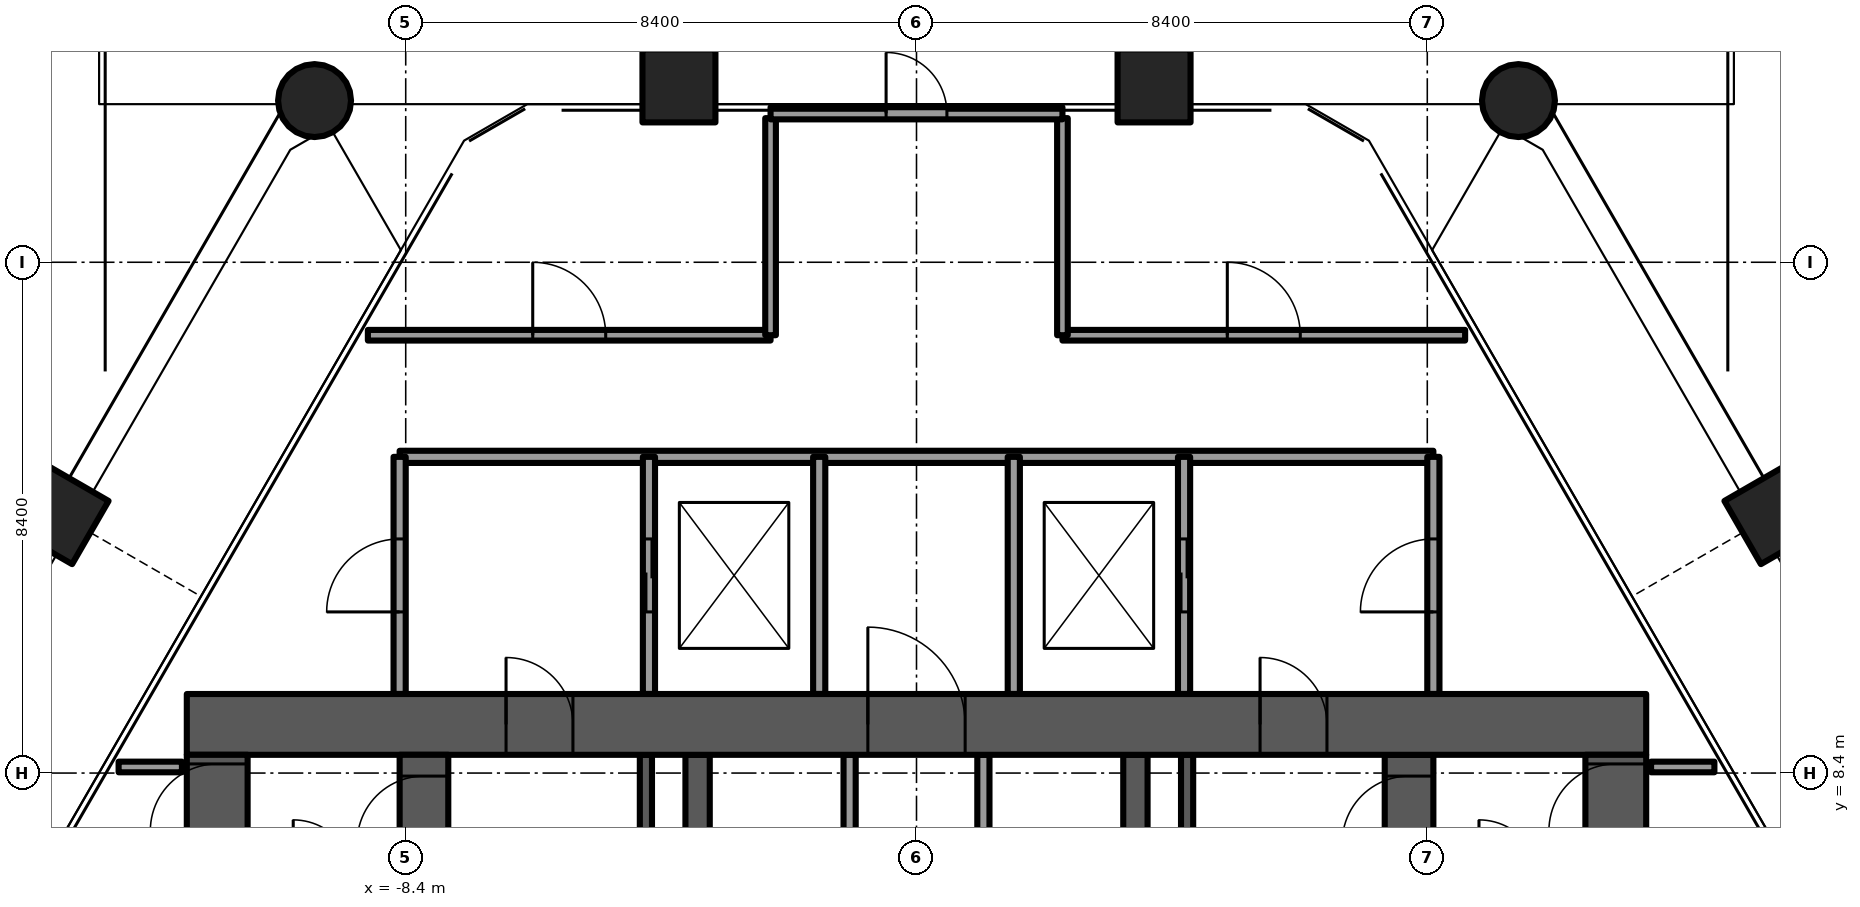
"""IFC4 building model, lengths in metres.
Left out: names, types, materials, properties, quantities, classifications, styles, units other than length and angle.
Written with IfcOpenShell. Run it as: python <this file> out.ifc"""

import sys

from ifc_helpers import new_model, si_unit, direction, frame, frame_2d, origin, origin_2d, place, context, subcontext, project, spatial, rectangle, circle, extrude, element, fill, save


model = new_model("IFC4")
c1 = context("Model", 3, precision=1e-05, world=origin(), true_north=direction((0.0, 1.0)))
c2 = subcontext(c1, "Body", "Model", "MODEL_VIEW")
j1 = project(units=[si_unit("LENGTHUNIT", "METRE"), si_unit("PLANEANGLEUNIT", "RADIAN")], contexts=[c1])
p1 = place(None, origin())
s1 = spatial("IfcSite", under=j1, at=p1, CompositionType="ELEMENT")
p2 = place(p1, origin())
s2 = spatial("IfcBuilding", under=s1, at=p2, CompositionType="ELEMENT")
p3 = place(p2, frame((0.0, 0.0, 146.0)))
s3 = spatial("IfcBuildingStorey", under=s2, at=p3, CompositionType="ELEMENT", Elevation=146.0)
for number, where, z_axis, x_axis in (
    (1, (-9.899, 19.459, -1.2), (0.0, 0.0, 1.0), (1.0, 0.0, 0.0)),
    (2, (9.899, 19.459, -1.2), (0.0, 0.0, 1.0), (1.0, 0.0, 0.0)),
):
    element("IfcColumn", number, at=place(p3, frame(where, z_axis=z_axis, x_axis=x_axis)), inside=s3, PredefinedType="COLUMN", context=c2, shape_type="SweptSolid", body=[
        extrude(circle(Radius=0.6, at=origin_2d()), origin(), (0.0, 0.0, 1.0), 5.0),
    ])
for number, where, z_axis, x_axis in (
    (3, (3.907, 19.7, -1.2), (0.0, 0.0, 1.0), (1.0, 0.0, 0.0)),
    (4, (-3.907, 19.7, -1.2), (0.0, 0.0, 1.0), (1.0, 0.0, 0.0)),
    (5, (-14.106, 12.655, -1.2), (0.0, 0.0, 1.0), (0.5, 0.866, 0.0)),
    (6, (14.106, 12.655, -1.2), (0.0, 0.0, 1.0), (0.5, -0.866, 0.0)),
):
    element("IfcColumn", number, at=place(p3, frame(where, z_axis=z_axis, x_axis=x_axis)), inside=s3, PredefinedType="COLUMN", context=c2, shape_type="SweptSolid", body=[
        extrude(rectangle(XDim=1.2, YDim=1.2, at=origin_2d()), origin(), (0.0, 0.0, 1.0), 5.0),
    ])
p4 = place(p3, frame((-12.0, 9.2, -0.3), z_axis=(0.0, 0.0, 1.0), x_axis=(1.0, 0.0, 0.0)))
e7 = element("IfcWall", 7, at=p4, inside=s3, PredefinedType="SHEAR", context=c2, shape_type="SweptSolid", body=[
    extrude(rectangle(XDim=24.0, YDim=1.0, at=frame_2d((12.0, 0.0))), origin(), (0.0, 0.0, 1.0), 5.0),
])
p5 = place(p4, frame((11.2, 0.0, 0.0)))
e8 = element("IfcOpeningElement", 8, at=p5, cuts=e7, PredefinedType="OPENING", context=c2, shape_type="SweptSolid", body=[
    extrude(rectangle(XDim=1.6, YDim=2.1, at=frame_2d((0.8, 1.05))), frame((0.0, 0.5, 0.0), z_axis=(0.0, -1.0, 0.0), x_axis=(1.0, 0.0, 0.0)), (0.0, 0.0, 1.0), 1.0),
])
p6 = place(p4, frame((5.25, 0.0, 0.0)))
e9 = element("IfcOpeningElement", 9, at=p6, cuts=e7, PredefinedType="OPENING", context=c2, shape_type="SweptSolid", body=[
    extrude(rectangle(XDim=1.1, YDim=2.1, at=frame_2d((0.55, 1.05))), frame((0.0, 0.5, 0.0), z_axis=(0.0, -1.0, 0.0), x_axis=(1.0, 0.0, 0.0)), (0.0, 0.0, 1.0), 1.0),
])
p7 = place(p4, frame((17.65, 0.0, 0.0)))
e10 = element("IfcOpeningElement", 10, at=p7, cuts=e7, PredefinedType="OPENING", context=c2, shape_type="SweptSolid", body=[
    extrude(rectangle(XDim=1.1, YDim=2.1, at=frame_2d((0.55, 1.05))), frame((0.0, 0.5, 0.0), z_axis=(0.0, -1.0, 0.0), x_axis=(1.0, 0.0, 0.0)), (0.0, 0.0, 1.0), 1.0),
])
p8 = place(p3, frame((-8.1, -0.7, -0.3), z_axis=(0.0, 0.0, 1.0), x_axis=(0.0, 1.0, 0.0)))
e11 = element("IfcWall", 11, at=p8, inside=s3, PredefinedType="SHEAR", context=c2, shape_type="SweptSolid", body=[
    extrude(rectangle(XDim=9.4, YDim=0.8, at=frame_2d((4.7, 0.0))), origin(), (0.0, 0.0, 1.0), 5.0),
])
p9 = place(p8, frame((7.95, 0.0, 0.0)))
e12 = element("IfcOpeningElement", 12, at=p9, cuts=e11, PredefinedType="OPENING", context=c2, shape_type="SweptSolid", body=[
    extrude(rectangle(XDim=1.1, YDim=2.1, at=frame_2d((0.55, 1.05))), frame((0.0, 0.4, 0.0), z_axis=(0.0, -1.0, 0.0), x_axis=(1.0, 0.0, 0.0)), (0.0, 0.0, 1.0), 0.8),
])
p10 = place(p3, frame((8.1, -0.7, -0.3), z_axis=(0.0, 0.0, 1.0), x_axis=(0.0, 1.0, 0.0)))
e13 = element("IfcWall", 13, at=p10, inside=s3, PredefinedType="SHEAR", context=c2, shape_type="SweptSolid", body=[
    extrude(rectangle(XDim=9.4, YDim=0.8, at=frame_2d((4.7, 0.0))), origin(), (0.0, 0.0, 1.0), 5.0),
])
p11 = place(p10, frame((7.95, 0.0, 0.0)))
e14 = element("IfcOpeningElement", 14, at=p11, cuts=e13, PredefinedType="OPENING", context=c2, shape_type="SweptSolid", body=[
    extrude(rectangle(XDim=1.1, YDim=2.1, at=frame_2d((0.55, 1.05))), frame((0.0, 0.4, 0.0), z_axis=(0.0, -1.0, 0.0), x_axis=(1.0, 0.0, 0.0)), (0.0, 0.0, 1.0), 0.8),
])
for number, where, z_axis, x_axis in (
    (15, (-3.6, -0.7, -0.3), (0.0, 0.0, 1.0), (0.0, 1.0, 0.0)),
    (16, (3.6, -0.7, -0.3), (0.0, 0.0, 1.0), (0.0, 1.0, 0.0)),
):
    element("IfcWall", number, at=place(p3, frame(where, z_axis=z_axis, x_axis=x_axis)), inside=s3, PredefinedType="SHEAR", context=c2, shape_type="SweptSolid", body=[
        extrude(rectangle(XDim=9.4, YDim=0.4, at=frame_2d((4.7, 0.0))), origin(), (0.0, 0.0, 1.0), 5.0),
    ])
p12 = place(p3, frame((-11.5, -0.7, -0.3), z_axis=(0.0, 0.0, 1.0), x_axis=(0.0, 1.0, 0.0)))
e17 = element("IfcWall", 17, at=p12, inside=s3, PredefinedType="SHEAR", context=c2, shape_type="SweptSolid", body=[
    extrude(rectangle(XDim=9.4, YDim=1.0, at=frame_2d((4.7, 0.0))), origin(), (0.0, 0.0, 1.0), 5.0),
])
p13 = place(p12, frame((8.15, 0.0, 0.0)))
e18 = element("IfcOpeningElement", 18, at=p13, cuts=e17, PredefinedType="OPENING", context=c2, shape_type="SweptSolid", body=[
    extrude(rectangle(XDim=1.1, YDim=2.1, at=frame_2d((0.55, 1.05))), frame((0.0, 0.5, 0.0), z_axis=(0.0, -1.0, 0.0), x_axis=(1.0, 0.0, 0.0)), (0.0, 0.0, 1.0), 1.0),
])
p14 = place(p12, frame((0.55, 0.0, 0.0)))
e19 = element("IfcOpeningElement", 19, at=p14, cuts=e17, PredefinedType="OPENING", context=c2, shape_type="SweptSolid", body=[
    extrude(rectangle(XDim=1.2, YDim=2.1, at=frame_2d((0.6, 1.05))), frame((0.0, 0.5, 0.0), z_axis=(0.0, -1.0, 0.0), x_axis=(1.0, 0.0, 0.0)), (0.0, 0.0, 1.0), 1.0),
])
p15 = place(p12, frame((3.0, 0.0, 0.0)))
e20 = element("IfcOpeningElement", 20, at=p15, cuts=e17, PredefinedType="OPENING", context=c2, shape_type="SweptSolid", body=[
    extrude(rectangle(XDim=1.2, YDim=2.1, at=frame_2d((0.6, 1.05))), frame((0.0, 0.5, 0.0), z_axis=(0.0, -1.0, 0.0), x_axis=(1.0, 0.0, 0.0)), (0.0, 0.0, 1.0), 1.0),
])
p16 = place(p3, frame((11.5, -0.7, -0.3), z_axis=(0.0, 0.0, 1.0), x_axis=(0.0, 1.0, 0.0)))
e21 = element("IfcWall", 21, at=p16, inside=s3, PredefinedType="SHEAR", context=c2, shape_type="SweptSolid", body=[
    extrude(rectangle(XDim=9.4, YDim=1.0, at=frame_2d((4.7, 0.0))), origin(), (0.0, 0.0, 1.0), 5.0),
])
p17 = place(p16, frame((8.15, 0.0, 0.0)))
e22 = element("IfcOpeningElement", 22, at=p17, cuts=e21, PredefinedType="OPENING", context=c2, shape_type="SweptSolid", body=[
    extrude(rectangle(XDim=1.1, YDim=2.1, at=frame_2d((0.55, 1.05))), frame((0.0, 0.5, 0.0), z_axis=(0.0, -1.0, 0.0), x_axis=(1.0, 0.0, 0.0)), (0.0, 0.0, 1.0), 1.0),
])
p18 = place(p16, frame((0.55, 0.0, 0.0)))
e23 = element("IfcOpeningElement", 23, at=p18, cuts=e21, PredefinedType="OPENING", context=c2, shape_type="SweptSolid", body=[
    extrude(rectangle(XDim=1.2, YDim=2.1, at=frame_2d((0.6, 1.05))), frame((0.0, 0.5, 0.0), z_axis=(0.0, -1.0, 0.0), x_axis=(1.0, 0.0, 0.0)), (0.0, 0.0, 1.0), 1.0),
])
p19 = place(p16, frame((3.0, 0.0, 0.0)))
e24 = element("IfcOpeningElement", 24, at=p19, cuts=e21, PredefinedType="OPENING", context=c2, shape_type="SweptSolid", body=[
    extrude(rectangle(XDim=1.2, YDim=2.1, at=frame_2d((0.6, 1.05))), frame((0.0, 0.5, 0.0), z_axis=(0.0, -1.0, 0.0), x_axis=(1.0, 0.0, 0.0)), (0.0, 0.0, 1.0), 1.0),
])
for number, where, z_axis, x_axis in (
    (25, (-1.1, 5.8, 0.0), (0.0, 0.0, 1.0), (0.0, 1.0, 0.0)),
    (26, (1.1, 5.8, 0.0), (0.0, 0.0, 1.0), (0.0, 1.0, 0.0)),
):
    element("IfcWall", number, at=place(p3, frame(where, z_axis=z_axis, x_axis=x_axis)), inside=s3, PredefinedType="PARTITIONING", context=c2, shape_type="SweptSolid", body=[
        extrude(rectangle(XDim=2.9, YDim=0.2, at=frame_2d((1.45, 0.0))), origin(), (0.0, 0.0, 1.0), 4.7),
    ])
for number, where, z_axis, x_axis in (
    (27, (-4.45, 0.9, -0.3), (0.0, 0.0, 1.0), (0.0, 1.0, 0.0)),
    (28, (4.45, 0.9, -0.3), (0.0, 0.0, 1.0), (0.0, 1.0, 0.0)),
):
    element("IfcWall", number, at=place(p3, frame(where, z_axis=z_axis, x_axis=x_axis)), inside=s3, PredefinedType="SOLIDWALL", context=c2, shape_type="SweptSolid", body=[
        extrude(rectangle(XDim=7.8, YDim=0.2, at=frame_2d((3.9, 0.0))), origin(), (0.0, 0.0, 1.0), 5.0),
    ])
p20 = place(p3, frame((-8.5, 13.6, 0.0), z_axis=(0.0, 0.0, 1.0), x_axis=(1.0, 0.0, 0.0)))
e29 = element("IfcWall", 29, at=p20, inside=s3, PredefinedType="PARTITIONING", context=c2, shape_type="SweptSolid", body=[
    extrude(rectangle(XDim=17.0, YDim=0.2, at=frame_2d((8.5, 0.0))), origin(), (0.0, 0.0, 1.0), 4.7),
])
p21 = place(p3, frame((-8.5, 9.7, 0.0), z_axis=(0.0, 0.0, 1.0), x_axis=(0.0, 1.0, 0.0)))
e30 = element("IfcWall", 30, at=p21, inside=s3, PredefinedType="PARTITIONING", context=c2, shape_type="SweptSolid", body=[
    extrude(rectangle(XDim=3.9, YDim=0.2, at=frame_2d((1.95, 0.0))), origin(), (0.0, 0.0, 1.0), 4.7),
])
p22 = place(p21, frame((1.35, 0.0, 0.0)))
e31 = element("IfcOpeningElement", 31, at=p22, cuts=e30, PredefinedType="OPENING", context=c2, shape_type="SweptSolid", body=[
    extrude(rectangle(XDim=1.2, YDim=2.1, at=frame_2d((0.6, 1.05))), frame((0.0, 0.1, 0.0), z_axis=(0.0, -1.0, 0.0), x_axis=(1.0, 0.0, 0.0)), (0.0, 0.0, 1.0), 0.2),
])
p23 = place(p3, frame((8.5, 9.7, 0.0), z_axis=(0.0, 0.0, 1.0), x_axis=(0.0, 1.0, 0.0)))
e32 = element("IfcWall", 32, at=p23, inside=s3, PredefinedType="PARTITIONING", context=c2, shape_type="SweptSolid", body=[
    extrude(rectangle(XDim=3.9, YDim=0.2, at=frame_2d((1.95, 0.0))), origin(), (0.0, 0.0, 1.0), 4.7),
])
p24 = place(p23, frame((1.35, 0.0, 0.0)))
e33 = element("IfcOpeningElement", 33, at=p24, cuts=e32, PredefinedType="OPENING", context=c2, shape_type="SweptSolid", body=[
    extrude(rectangle(XDim=1.2, YDim=2.1, at=frame_2d((0.6, 1.05))), frame((0.0, 0.1, 0.0), z_axis=(0.0, -1.0, 0.0), x_axis=(1.0, 0.0, 0.0)), (0.0, 0.0, 1.0), 0.2),
])
p25 = place(p3, frame((-4.4, 9.7, 0.0), z_axis=(0.0, 0.0, 1.0), x_axis=(0.0, 1.0, 0.0)))
e34 = element("IfcWall", 34, at=p25, inside=s3, PredefinedType="PARTITIONING", context=c2, shape_type="SweptSolid", body=[
    extrude(rectangle(XDim=3.9, YDim=0.2, at=frame_2d((1.95, 0.0))), origin(), (0.0, 0.0, 1.0), 4.7),
])
p26 = place(p25, frame((1.35, 0.0, 0.0)))
e35 = element("IfcOpeningElement", 35, at=p26, cuts=e34, PredefinedType="OPENING", context=c2, shape_type="SweptSolid", body=[
    extrude(rectangle(XDim=1.2, YDim=2.1, at=frame_2d((0.6, 1.05))), frame((0.0, 0.1, 0.0), z_axis=(0.0, -1.0, 0.0), x_axis=(1.0, 0.0, 0.0)), (0.0, 0.0, 1.0), 0.2),
])
p27 = place(p3, frame((4.4, 9.7, 0.0), z_axis=(0.0, 0.0, 1.0), x_axis=(0.0, 1.0, 0.0)))
e36 = element("IfcWall", 36, at=p27, inside=s3, PredefinedType="PARTITIONING", context=c2, shape_type="SweptSolid", body=[
    extrude(rectangle(XDim=3.9, YDim=0.2, at=frame_2d((1.95, 0.0))), origin(), (0.0, 0.0, 1.0), 4.7),
])
p28 = place(p27, frame((1.35, 0.0, 0.0)))
e37 = element("IfcOpeningElement", 37, at=p28, cuts=e36, PredefinedType="OPENING", context=c2, shape_type="SweptSolid", body=[
    extrude(rectangle(XDim=1.2, YDim=2.1, at=frame_2d((0.6, 1.05))), frame((0.0, 0.1, 0.0), z_axis=(0.0, -1.0, 0.0), x_axis=(1.0, 0.0, 0.0)), (0.0, 0.0, 1.0), 0.2),
])
for number, where, z_axis, x_axis in (
    (38, (-1.6, 9.7, 0.0), (0.0, 0.0, 1.0), (0.0, 1.0, 0.0)),
    (39, (1.6, 9.7, 0.0), (0.0, 0.0, 1.0), (0.0, 1.0, 0.0)),
):
    element("IfcWall", number, at=place(p3, frame(where, z_axis=z_axis, x_axis=x_axis)), inside=s3, PredefinedType="PARTITIONING", context=c2, shape_type="SweptSolid", body=[
        extrude(rectangle(XDim=3.9, YDim=0.2, at=frame_2d((1.95, 0.0))), origin(), (0.0, 0.0, 1.0), 4.7),
    ])
for number, where, z_axis, x_axis in (
    (40, (-13.122, 8.5, 0.0), (0.0, 0.0, 1.0), (1.0, 0.0, 0.0)),
    (41, (12.08, 8.5, 0.0), (0.0, 0.0, 1.0), (1.0, 0.0, 0.0)),
):
    element("IfcWall", number, at=place(p3, frame(where, z_axis=z_axis, x_axis=x_axis)), inside=s3, PredefinedType="PARTITIONING", context=c2, shape_type="SweptSolid", body=[
        extrude(rectangle(XDim=1.042, YDim=0.175, at=frame_2d((0.521, 0.0))), origin(), (0.0, 0.0, 1.0), 4.7),
    ])
p29 = place(p3, frame((-9.022, 15.6, 0.0), z_axis=(0.0, 0.0, 1.0), x_axis=(1.0, 0.0, 0.0)))
e42 = element("IfcWall", 42, at=p29, inside=s3, PredefinedType="PARTITIONING", context=c2, shape_type="SweptSolid", body=[
    extrude(rectangle(XDim=6.622, YDim=0.175, at=frame_2d((3.311, 0.0))), origin(), (0.0, 0.0, 1.0), 4.7),
])
p30 = place(p29, frame((2.711, 0.0, 0.0)))
e43 = element("IfcOpeningElement", 43, at=p30, cuts=e42, PredefinedType="OPENING", context=c2, shape_type="SweptSolid", body=[
    extrude(rectangle(XDim=1.2, YDim=2.1, at=frame_2d((0.6, 1.05))), frame((0.0, 0.087, 0.0), z_axis=(0.0, -1.0, 0.0), x_axis=(1.0, 0.0, 0.0)), (0.0, 0.0, 1.0), 0.175),
])
p31 = place(p3, frame((2.4, 15.6, 0.0), z_axis=(0.0, 0.0, 1.0), x_axis=(1.0, 0.0, 0.0)))
e44 = element("IfcWall", 44, at=p31, inside=s3, PredefinedType="PARTITIONING", context=c2, shape_type="SweptSolid", body=[
    extrude(rectangle(XDim=6.622, YDim=0.175, at=frame_2d((3.311, 0.0))), origin(), (0.0, 0.0, 1.0), 4.7),
])
p32 = place(p31, frame((2.711, 0.0, 0.0)))
e45 = element("IfcOpeningElement", 45, at=p32, cuts=e44, PredefinedType="OPENING", context=c2, shape_type="SweptSolid", body=[
    extrude(rectangle(XDim=1.2, YDim=2.1, at=frame_2d((0.6, 1.05))), frame((0.0, 0.087, 0.0), z_axis=(0.0, -1.0, 0.0), x_axis=(1.0, 0.0, 0.0)), (0.0, 0.0, 1.0), 0.175),
])
for number, where, z_axis, x_axis in (
    (46, (-2.4, 15.6, 0.0), (0.0, 0.0, 1.0), (0.0, 1.0, 0.0)),
    (47, (2.4, 15.6, 0.0), (0.0, 0.0, 1.0), (0.0, 1.0, 0.0)),
):
    element("IfcWall", number, at=place(p3, frame(where, z_axis=z_axis, x_axis=x_axis)), inside=s3, PredefinedType="PARTITIONING", context=c2, shape_type="SweptSolid", body=[
        extrude(rectangle(XDim=3.57, YDim=0.175, at=frame_2d((1.785, 0.0))), origin(), (0.0, 0.0, 1.0), 3.8),
    ])
p33 = place(p3, frame((-2.4, 19.25, 0.0), z_axis=(0.0, 0.0, 1.0), x_axis=(1.0, 0.0, 0.0)))
e48 = element("IfcWall", 48, at=p33, inside=s3, PredefinedType="PARTITIONING", context=c2, shape_type="SweptSolid", body=[
    extrude(rectangle(XDim=4.8, YDim=0.2, at=frame_2d((2.4, 0.0))), origin(), (0.0, 0.0, 1.0), 4.7),
])
p34 = place(p33, frame((1.9, 0.0, 0.0)))
e49 = element("IfcOpeningElement", 49, at=p34, cuts=e48, PredefinedType="OPENING", context=c2, shape_type="SweptSolid", body=[
    extrude(rectangle(XDim=1.0, YDim=2.1, at=frame_2d((0.5, 1.05))), frame((0.0, 0.1, 0.0), z_axis=(0.0, -1.0, 0.0), x_axis=(1.0, 0.0, 0.0)), (0.0, 0.0, 1.0), 0.2),
])
p35 = place(p5, origin())
e50 = element("IfcDoor", 50, at=p35, inside=s3, OperationType="DOUBLE_DOOR_SINGLE_SWING", PredefinedType="DOOR", context=c2, shape_type="SweptSolid", body=[
    extrude(rectangle(XDim=1.6, YDim=2.1, at=frame_2d((0.8, 1.05))), frame((0.0, 0.025, 0.0), z_axis=(0.0, -1.0, 0.0), x_axis=(1.0, 0.0, 0.0)), (0.0, 0.0, 1.0), 0.05),
])
fill(e8, e50)
p36 = place(p6, origin())
e51 = element("IfcDoor", 51, at=p36, inside=s3, OperationType="SINGLE_SWING_LEFT", PredefinedType="DOOR", context=c2, shape_type="SweptSolid", body=[
    extrude(rectangle(XDim=1.1, YDim=2.1, at=frame_2d((0.55, 1.05))), frame((0.0, 0.025, 0.0), z_axis=(0.0, -1.0, 0.0), x_axis=(1.0, 0.0, 0.0)), (0.0, 0.0, 1.0), 0.05),
])
fill(e9, e51)
p37 = place(p9, origin())
e52 = element("IfcDoor", 52, at=p37, inside=s3, OperationType="SINGLE_SWING_RIGHT", PredefinedType="DOOR", context=c2, shape_type="SweptSolid", body=[
    extrude(rectangle(XDim=1.1, YDim=2.1, at=frame_2d((0.55, 1.05))), frame((0.0, 0.025, 0.0), z_axis=(0.0, -1.0, 0.0), x_axis=(1.0, 0.0, 0.0)), (0.0, 0.0, 1.0), 0.05),
])
fill(e12, e52)
p38 = place(p7, origin())
e53 = element("IfcDoor", 53, at=p38, inside=s3, OperationType="SINGLE_SWING_RIGHT", PredefinedType="DOOR", context=c2, shape_type="SweptSolid", body=[
    extrude(rectangle(XDim=1.1, YDim=2.1, at=frame_2d((0.55, 1.05))), frame((0.0, 0.025, 0.0), z_axis=(0.0, -1.0, 0.0), x_axis=(1.0, 0.0, 0.0)), (0.0, 0.0, 1.0), 0.05),
])
fill(e10, e53)
p39 = place(p11, origin())
e54 = element("IfcDoor", 54, at=p39, inside=s3, OperationType="SINGLE_SWING_LEFT", PredefinedType="DOOR", context=c2, shape_type="SweptSolid", body=[
    extrude(rectangle(XDim=1.1, YDim=2.1, at=frame_2d((0.55, 1.05))), frame((0.0, 0.025, 0.0), z_axis=(0.0, -1.0, 0.0), x_axis=(1.0, 0.0, 0.0)), (0.0, 0.0, 1.0), 0.05),
])
fill(e14, e54)
p40 = place(p26, origin())
e55 = element("IfcDoor", 55, at=p40, inside=s3, OperationType="SLIDING_TO_LEFT", PredefinedType="DOOR", context=c2, shape_type="SweptSolid", body=[
    extrude(rectangle(XDim=1.2, YDim=2.1, at=frame_2d((0.6, 1.05))), frame((0.0, 0.025, 0.0), z_axis=(0.0, -1.0, 0.0), x_axis=(1.0, 0.0, 0.0)), (0.0, 0.0, 1.0), 0.05),
])
fill(e35, e55)
p41 = place(p22, origin())
e56 = element("IfcDoor", 56, at=p41, inside=s3, OperationType="SINGLE_SWING_LEFT", PredefinedType="DOOR", context=c2, shape_type="SweptSolid", body=[
    extrude(rectangle(XDim=1.2, YDim=2.1, at=frame_2d((0.6, 1.05))), frame((0.0, 0.025, 0.0), z_axis=(0.0, -1.0, 0.0), x_axis=(1.0, 0.0, 0.0)), (0.0, 0.0, 1.0), 0.05),
])
fill(e31, e56)
p42 = place(p28, origin())
e57 = element("IfcDoor", 57, at=p42, inside=s3, OperationType="SLIDING_TO_LEFT", PredefinedType="DOOR", context=c2, shape_type="SweptSolid", body=[
    extrude(rectangle(XDim=1.2, YDim=2.1, at=frame_2d((0.6, 1.05))), frame((0.0, 0.025, 0.0), z_axis=(0.0, -1.0, 0.0), x_axis=(1.0, 0.0, 0.0)), (0.0, 0.0, 1.0), 0.05),
])
fill(e37, e57)
p43 = place(p24, origin())
e58 = element("IfcDoor", 58, at=p43, inside=s3, OperationType="SINGLE_SWING_LEFT", PredefinedType="DOOR", context=c2, shape_type="SweptSolid", body=[
    extrude(rectangle(XDim=1.2, YDim=2.1, at=frame_2d((0.6, 1.05))), frame((0.0, 0.025, 0.0), z_axis=(0.0, -1.0, 0.0), x_axis=(1.0, 0.0, 0.0)), (0.0, 0.0, 1.0), 0.05),
])
fill(e33, e58)
p44 = place(p13, origin())
e59 = element("IfcDoor", 59, at=p44, inside=s3, OperationType="SINGLE_SWING_LEFT", PredefinedType="DOOR", context=c2, shape_type="SweptSolid", body=[
    extrude(rectangle(XDim=1.1, YDim=2.1, at=frame_2d((0.55, 1.05))), frame((0.0, 0.025, 0.0), z_axis=(0.0, -1.0, 0.0), x_axis=(1.0, 0.0, 0.0)), (0.0, 0.0, 1.0), 0.05),
])
fill(e18, e59)
p45 = place(p17, origin())
e60 = element("IfcDoor", 60, at=p45, inside=s3, OperationType="SINGLE_SWING_RIGHT", PredefinedType="DOOR", context=c2, shape_type="SweptSolid", body=[
    extrude(rectangle(XDim=1.1, YDim=2.1, at=frame_2d((0.55, 1.05))), frame((0.0, 0.025, 0.0), z_axis=(0.0, -1.0, 0.0), x_axis=(1.0, 0.0, 0.0)), (0.0, 0.0, 1.0), 0.05),
])
fill(e22, e60)
p46 = place(p30, origin())
e61 = element("IfcDoor", 61, at=p46, inside=s3, OperationType="SINGLE_SWING_RIGHT", PredefinedType="DOOR", context=c2, shape_type="SweptSolid", body=[
    extrude(rectangle(XDim=1.2, YDim=2.1, at=frame_2d((0.6, 1.05))), frame((0.0, 0.025, 0.0), z_axis=(0.0, -1.0, 0.0), x_axis=(1.0, 0.0, 0.0)), (0.0, 0.0, 1.0), 0.05),
])
fill(e43, e61)
p47 = place(p32, origin())
e62 = element("IfcDoor", 62, at=p47, inside=s3, OperationType="SINGLE_SWING_LEFT", PredefinedType="DOOR", context=c2, shape_type="SweptSolid", body=[
    extrude(rectangle(XDim=1.2, YDim=2.1, at=frame_2d((0.6, 1.05))), frame((0.0, 0.025, 0.0), z_axis=(0.0, -1.0, 0.0), x_axis=(1.0, 0.0, 0.0)), (0.0, 0.0, 1.0), 0.05),
])
fill(e45, e62)
p48 = place(p34, origin())
e63 = element("IfcDoor", 63, at=p48, inside=s3, OperationType="SINGLE_SWING_LEFT", PredefinedType="DOOR", context=c2, shape_type="SweptSolid", body=[
    extrude(rectangle(XDim=1.0, YDim=2.1, at=frame_2d((0.5, 1.05))), frame((0.0, 0.025, 0.0), z_axis=(0.0, -1.0, 0.0), x_axis=(1.0, 0.0, 0.0)), (0.0, 0.0, 1.0), 0.05),
])
fill(e49, e63)
save(model, sys.argv[1])
